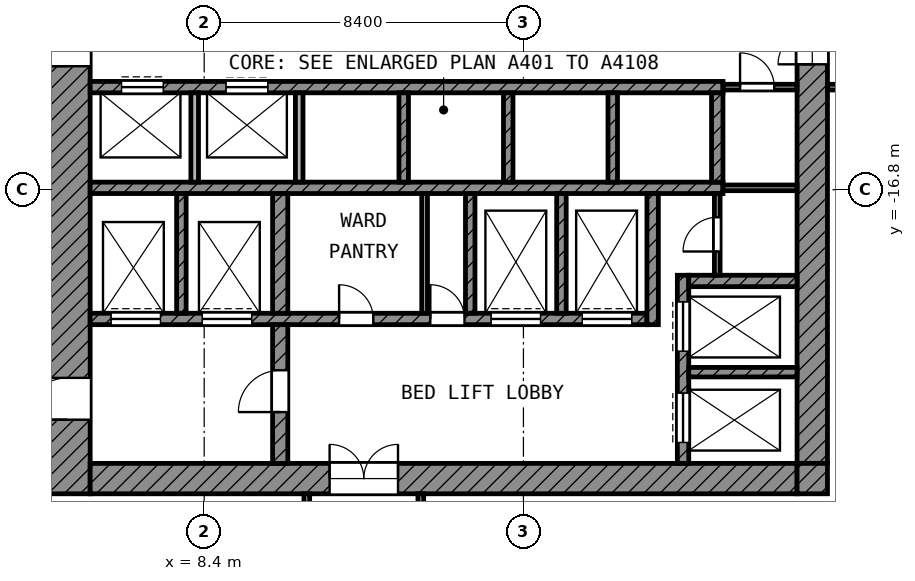
"""IFC4 building model, lengths in metres.
Left out: names, types, materials, properties, quantities, classifications, styles, units other than length and angle.
Written with IfcOpenShell. Run it as: python <this file> out.ifc"""

import sys

from ifc_helpers import new_model, si_unit, direction, frame, frame_2d, origin, place, context, subcontext, project, spatial, rectangle, extrude, element, fill, save


model = new_model("IFC4")
c1 = context("Model", 3, precision=1e-05, world=origin(), true_north=direction((0.0, 1.0)))
c2 = subcontext(c1, "Body", "Model", "MODEL_VIEW")
j1 = project(units=[si_unit("LENGTHUNIT", "METRE"), si_unit("PLANEANGLEUNIT", "RADIAN")], contexts=[c1])
p1 = place(None, origin())
s1 = spatial("IfcSite", under=j1, at=p1, CompositionType="ELEMENT")
p2 = place(p1, origin())
s2 = spatial("IfcBuilding", under=s1, at=p2, CompositionType="ELEMENT")
p3 = place(p2, frame((0.0, 0.0, 264.2)))
s3 = spatial("IfcBuildingStorey", under=s2, at=p3, CompositionType="ELEMENT", Elevation=264.2)
p4 = place(p3, frame((4.8, -24.8, 0.0), z_axis=(0.0, 0.0, 1.0), x_axis=(0.0, 1.0, 0.0)))
e1 = element("IfcWall", 1, at=p4, inside=s3, PredefinedType="SHEAR", context=c2, shape_type="SweptSolid", body=[
    extrude(rectangle(XDim=19.4, YDim=1.2, at=frame_2d((9.7, 0.0))), origin(), (0.0, 0.0, 1.0), 3.6),
])
p5 = place(p4, frame((11.25, 0.0, 0.0)))
e2 = element("IfcOpeningElement", 2, at=p5, cuts=e1, PredefinedType="OPENING", context=c2, shape_type="SweptSolid", body=[
    extrude(rectangle(XDim=1.1, YDim=2.1, at=frame_2d((0.55, 1.05))), frame((0.0, 0.61, 0.0), z_axis=(0.0, -1.0, 0.0), x_axis=(1.0, 0.0, 0.0)), (0.0, 0.0, 1.0), 1.22),
])
p6 = place(p4, frame((1.95, 0.0, 0.0)))
e3 = element("IfcOpeningElement", 3, at=p6, cuts=e1, PredefinedType="OPENING", context=c2, shape_type="SweptSolid", body=[
    extrude(rectangle(XDim=1.1, YDim=2.1, at=frame_2d((0.55, 1.05))), frame((0.0, 0.61, 0.0), z_axis=(0.0, -1.0, 0.0), x_axis=(1.0, 0.0, 0.0)), (0.0, 0.0, 1.0), 1.22),
])
p7 = place(p3, frame((24.4, -24.0, 0.0), z_axis=(0.0, 0.0, 1.0), x_axis=(0.0, 1.0, 0.0)))
e4 = element("IfcWall", 4, at=p7, inside=s3, PredefinedType="SHEAR", context=c2, shape_type="SweptSolid", body=[
    extrude(rectangle(XDim=18.6, YDim=0.8, at=frame_2d((9.3, 0.0))), origin(), (0.0, 0.0, 1.0), 3.6),
])
p8 = place(p7, frame((10.5, 0.0, 0.0)))
e5 = element("IfcOpeningElement", 5, at=p8, cuts=e4, PredefinedType="OPENING", context=c2, shape_type="SweptSolid", body=[
    extrude(rectangle(XDim=1.8, YDim=2.1, at=frame_2d((0.9, 1.05))), frame((0.0, 0.41, 0.0), z_axis=(0.0, -1.0, 0.0), x_axis=(1.0, 0.0, 0.0)), (0.0, 0.0, 1.0), 0.82),
])
p9 = place(p3, frame((5.4, -24.4, 0.0), z_axis=(0.0, 0.0, 1.0), x_axis=(1.0, 0.0, 0.0)))
e6 = element("IfcWall", 6, at=p9, inside=s3, PredefinedType="SHEAR", context=c2, shape_type="SweptSolid", body=[
    extrude(rectangle(XDim=18.6, YDim=0.8, at=frame_2d((9.3, 0.0))), origin(), (0.0, 0.0, 1.0), 3.6),
])
p10 = place(p9, frame((6.3, 0.0, 0.0)))
e7 = element("IfcOpeningElement", 7, at=p10, cuts=e6, PredefinedType="OPENING", context=c2, shape_type="SweptSolid", body=[
    extrude(rectangle(XDim=1.8, YDim=2.1, at=frame_2d((0.9, 1.05))), frame((0.0, 0.41, 0.0), z_axis=(0.0, -1.0, 0.0), x_axis=(1.0, 0.0, 0.0)), (0.0, 0.0, 1.0), 0.82),
])
p11 = place(p3, frame((24.4, -24.8, 0.0), z_axis=(0.0, 0.0, 1.0), x_axis=(0.0, 1.0, 0.0)))
e8 = element("IfcWall", 8, at=p11, inside=s3, PredefinedType="SHEAR", context=c2, shape_type="SweptSolid", body=[
    extrude(rectangle(XDim=0.8, YDim=0.8, at=frame_2d((0.4, 0.0))), origin(), (0.0, 0.0, 1.0), 3.6),
])
p12 = place(p3, frame((5.4, -14.1, 0.0), z_axis=(0.0, 0.0, 1.0), x_axis=(1.0, 0.0, 0.0)))
e9 = element("IfcWall", 9, at=p12, inside=s3, PredefinedType="SHEAR", context=c2, shape_type="SweptSolid", body=[
    extrude(rectangle(XDim=16.65, YDim=0.3, at=frame_2d((8.325, 0.0))), origin(), (0.0, 0.0, 1.0), 3.6),
])
p13 = place(p12, frame((0.825, 0.0, 0.0)))
e10 = element("IfcOpeningElement", 10, at=p13, cuts=e9, PredefinedType="OPENING", context=c2, shape_type="SweptSolid", body=[
    extrude(rectangle(XDim=1.1, YDim=2.1, at=frame_2d((0.55, 1.05))), frame((0.0, 0.16, 0.0), z_axis=(0.0, -1.0, 0.0), x_axis=(1.0, 0.0, 0.0)), (0.0, 0.0, 1.0), 0.32),
])
p14 = place(p12, frame((3.575, 0.0, 0.0)))
e11 = element("IfcOpeningElement", 11, at=p14, cuts=e9, PredefinedType="OPENING", context=c2, shape_type="SweptSolid", body=[
    extrude(rectangle(XDim=1.1, YDim=2.1, at=frame_2d((0.55, 1.05))), frame((0.0, 0.16, 0.0), z_axis=(0.0, -1.0, 0.0), x_axis=(1.0, 0.0, 0.0)), (0.0, 0.0, 1.0), 0.32),
])
p15 = place(p3, frame((5.4, -16.75, 0.0), z_axis=(0.0, 0.0, 1.0), x_axis=(1.0, 0.0, 0.0)))
e12 = element("IfcWall", 12, at=p15, inside=s3, PredefinedType="SHEAR", context=c2, shape_type="SweptSolid", body=[
    extrude(rectangle(XDim=16.65, YDim=0.3, at=frame_2d((8.325, 0.0))), origin(), (0.0, 0.0, 1.0), 3.6),
])
p16 = place(p3, frame((5.4, -20.2, 0.0), z_axis=(0.0, 0.0, 1.0), x_axis=(1.0, 0.0, 0.0)))
e13 = element("IfcWall", 13, at=p16, inside=s3, PredefinedType="SHEAR", context=c2, shape_type="SweptSolid", body=[
    extrude(rectangle(XDim=14.65, YDim=0.3, at=frame_2d((7.325, 0.0))), origin(), (0.0, 0.0, 1.0), 3.6),
])
p17 = place(p16, frame((10.55, 0.0, 0.0)))
e14 = element("IfcOpeningElement", 14, at=p17, cuts=e13, PredefinedType="OPENING", context=c2, shape_type="SweptSolid", body=[
    extrude(rectangle(XDim=1.3, YDim=2.1, at=frame_2d((0.65, 1.05))), frame((0.0, 0.16, 0.0), z_axis=(0.0, -1.0, 0.0), x_axis=(1.0, 0.0, 0.0)), (0.0, 0.0, 1.0), 0.32),
])
p18 = place(p16, frame((12.95, 0.0, 0.0)))
e15 = element("IfcOpeningElement", 15, at=p18, cuts=e13, PredefinedType="OPENING", context=c2, shape_type="SweptSolid", body=[
    extrude(rectangle(XDim=1.3, YDim=2.1, at=frame_2d((0.65, 1.05))), frame((0.0, 0.16, 0.0), z_axis=(0.0, -1.0, 0.0), x_axis=(1.0, 0.0, 0.0)), (0.0, 0.0, 1.0), 0.32),
])
p19 = place(p16, frame((0.55, 0.0, 0.0)))
e16 = element("IfcOpeningElement", 16, at=p19, cuts=e13, PredefinedType="OPENING", context=c2, shape_type="SweptSolid", body=[
    extrude(rectangle(XDim=1.3, YDim=2.1, at=frame_2d((0.65, 1.05))), frame((0.0, 0.16, 0.0), z_axis=(0.0, -1.0, 0.0), x_axis=(1.0, 0.0, 0.0)), (0.0, 0.0, 1.0), 0.32),
])
p20 = place(p16, frame((2.95, 0.0, 0.0)))
e17 = element("IfcOpeningElement", 17, at=p20, cuts=e13, PredefinedType="OPENING", context=c2, shape_type="SweptSolid", body=[
    extrude(rectangle(XDim=1.3, YDim=2.1, at=frame_2d((0.65, 1.05))), frame((0.0, 0.16, 0.0), z_axis=(0.0, -1.0, 0.0), x_axis=(1.0, 0.0, 0.0)), (0.0, 0.0, 1.0), 0.32),
])
p21 = place(p16, frame((6.55, 0.0, 0.0)))
e18 = element("IfcOpeningElement", 18, at=p21, cuts=e13, PredefinedType="OPENING", context=c2, shape_type="SweptSolid", body=[
    extrude(rectangle(XDim=0.9, YDim=2.1, at=frame_2d((0.45, 1.05))), frame((0.0, 0.16, 0.0), z_axis=(0.0, -1.0, 0.0), x_axis=(1.0, 0.0, 0.0)), (0.0, 0.0, 1.0), 0.32),
])
p22 = place(p16, frame((8.95, 0.0, 0.0)))
e19 = element("IfcOpeningElement", 19, at=p22, cuts=e13, PredefinedType="OPENING", context=c2, shape_type="SweptSolid", body=[
    extrude(rectangle(XDim=0.9, YDim=2.1, at=frame_2d((0.45, 1.05))), frame((0.0, 0.16, 0.0), z_axis=(0.0, -1.0, 0.0), x_axis=(1.0, 0.0, 0.0)), (0.0, 0.0, 1.0), 0.32),
])
p23 = place(p3, frame((10.4, -24.0, 0.0), z_axis=(0.0, 0.0, 1.0), x_axis=(0.0, 1.0, 0.0)))
e20 = element("IfcWall", 20, at=p23, inside=s3, PredefinedType="SHEAR", context=c2, shape_type="SweptSolid", body=[
    extrude(rectangle(XDim=3.65, YDim=0.4, at=frame_2d((1.825, 0.0))), origin(), (0.0, 0.0, 1.0), 3.6),
])
p24 = place(p23, frame((1.35, 0.0, 0.0)))
e21 = element("IfcOpeningElement", 21, at=p24, cuts=e20, PredefinedType="OPENING", context=c2, shape_type="SweptSolid", body=[
    extrude(rectangle(XDim=1.1, YDim=2.1, at=frame_2d((0.55, 1.05))), frame((0.0, 0.21, 0.0), z_axis=(0.0, -1.0, 0.0), x_axis=(1.0, 0.0, 0.0)), (0.0, 0.0, 1.0), 0.42),
])
p25 = place(p3, frame((10.4, -20.05, 0.0), z_axis=(0.0, 0.0, 1.0), x_axis=(0.0, 1.0, 0.0)))
e22 = element("IfcWall", 22, at=p25, inside=s3, PredefinedType="SHEAR", context=c2, shape_type="SweptSolid", body=[
    extrude(rectangle(XDim=3.15, YDim=0.4, at=frame_2d((1.575, 0.0))), origin(), (0.0, 0.0, 1.0), 3.6),
])
p26 = place(p3, frame((20.2, -20.35, 0.0), z_axis=(0.0, 0.0, 1.0), x_axis=(0.0, 1.0, 0.0)))
e23 = element("IfcWall", 23, at=p26, inside=s3, PredefinedType="SHEAR", context=c2, shape_type="SweptSolid", body=[
    extrude(rectangle(XDim=3.45, YDim=0.3, at=frame_2d((1.725, 0.0))), origin(), (0.0, 0.0, 1.0), 3.6),
])
p27 = place(p3, frame((21.9, -16.6, 0.0), z_axis=(0.0, 0.0, 1.0), x_axis=(0.0, 1.0, 0.0)))
e24 = element("IfcWall", 24, at=p27, inside=s3, PredefinedType="SHEAR", context=c2, shape_type="SweptSolid", body=[
    extrude(rectangle(XDim=2.35, YDim=0.3, at=frame_2d((1.175, 0.0))), origin(), (0.0, 0.0, 1.0), 3.6),
])
p28 = place(p3, frame((21.15, -19.2, 0.0), z_axis=(0.0, 0.0, 1.0), x_axis=(1.0, 0.0, 0.0)))
e25 = element("IfcWall", 25, at=p28, inside=s3, PredefinedType="SHEAR", context=c2, shape_type="SweptSolid", body=[
    extrude(rectangle(XDim=2.85, YDim=0.3, at=frame_2d((1.425, 0.0))), origin(), (0.0, 0.0, 1.0), 3.6),
])
p29 = place(p3, frame((21.0, -24.0, 0.0), z_axis=(0.0, 0.0, 1.0), x_axis=(0.0, 1.0, 0.0)))
e26 = element("IfcWall", 26, at=p29, inside=s3, PredefinedType="SHEAR", context=c2, shape_type="SweptSolid", body=[
    extrude(rectangle(XDim=4.95, YDim=0.3, at=frame_2d((2.475, 0.0))), origin(), (0.0, 0.0, 1.0), 3.6),
])
p30 = place(p29, frame((2.95, 0.0, 0.0)))
e27 = element("IfcOpeningElement", 27, at=p30, cuts=e26, PredefinedType="OPENING", context=c2, shape_type="SweptSolid", body=[
    extrude(rectangle(XDim=1.3, YDim=2.1, at=frame_2d((0.65, 1.05))), frame((0.0, 0.16, 0.0), z_axis=(0.0, -1.0, 0.0), x_axis=(1.0, 0.0, 0.0)), (0.0, 0.0, 1.0), 0.32),
])
p31 = place(p29, frame((0.55, 0.0, 0.0)))
e28 = element("IfcOpeningElement", 28, at=p31, cuts=e26, PredefinedType="OPENING", context=c2, shape_type="SweptSolid", body=[
    extrude(rectangle(XDim=1.3, YDim=2.1, at=frame_2d((0.65, 1.05))), frame((0.0, 0.16, 0.0), z_axis=(0.0, -1.0, 0.0), x_axis=(1.0, 0.0, 0.0)), (0.0, 0.0, 1.0), 0.32),
])
p32 = place(p3, frame((21.15, -21.6, 0.0), z_axis=(0.0, 0.0, 1.0), x_axis=(1.0, 0.0, 0.0)))
e29 = element("IfcWall", 29, at=p32, inside=s3, PredefinedType="SHEAR", context=c2, shape_type="SweptSolid", body=[
    extrude(rectangle(XDim=2.85, YDim=0.25, at=frame_2d((1.425, 0.0))), origin(), (0.0, 0.0, 1.0), 3.6),
])
for number, where, z_axis, x_axis in (
    (30, (7.8, -20.05, 0.0), (0.0, 0.0, 1.0), (0.0, 1.0, 0.0)),
    (31, (15.4, -20.05, 0.0), (0.0, 0.0, 1.0), (0.0, 1.0, 0.0)),
    (32, (17.8, -20.05, 0.0), (0.0, 0.0, 1.0), (0.0, 1.0, 0.0)),
):
    element("IfcWall", number, at=place(p3, frame(where, z_axis=z_axis, x_axis=x_axis)), inside=s3, PredefinedType="SHEAR", context=c2, shape_type="SweptSolid", body=[
        extrude(rectangle(XDim=3.15, YDim=0.25, at=frame_2d((1.575, 0.0))), origin(), (0.0, 0.0, 1.0), 3.6),
    ])
for number, where, z_axis, x_axis in (
    (33, (8.15, -16.6, 0.0), (0.0, 0.0, 1.0), (0.0, 1.0, 0.0)),
    (34, (10.9, -16.6, 0.0), (0.0, 0.0, 1.0), (0.0, 1.0, 0.0)),
):
    element("IfcWall", number, at=place(p3, frame(where, z_axis=z_axis, x_axis=x_axis)), inside=s3, PredefinedType="PARTITIONING", context=c2, shape_type="SweptSolid", body=[
        extrude(rectangle(XDim=2.35, YDim=0.2, at=frame_2d((1.175, 0.0))), origin(), (0.0, 0.0, 1.0), 3.6),
    ])
for number, where, z_axis, x_axis in (
    (35, (13.65, -16.6, 0.0), (0.0, 0.0, 1.0), (0.0, 1.0, 0.0)),
    (36, (16.4, -16.6, 0.0), (0.0, 0.0, 1.0), (0.0, 1.0, 0.0)),
    (37, (19.15, -16.6, 0.0), (0.0, 0.0, 1.0), (0.0, 1.0, 0.0)),
):
    element("IfcWall", number, at=place(p3, frame(where, z_axis=z_axis, x_axis=x_axis)), inside=s3, PredefinedType="SHEAR", context=c2, shape_type="SweptSolid", body=[
        extrude(rectangle(XDim=2.35, YDim=0.25, at=frame_2d((1.175, 0.0))), origin(), (0.0, 0.0, 1.0), 3.6),
    ])
p33 = place(p3, frame((21.9, -19.05, 0.0), z_axis=(0.0, 0.0, 1.0), x_axis=(0.0, 1.0, 0.0)))
e38 = element("IfcWall", 38, at=p33, inside=s3, PredefinedType="PARTITIONING", context=c2, shape_type="SweptSolid", body=[
    extrude(rectangle(XDim=2.15, YDim=0.15, at=frame_2d((1.075, 0.0))), origin(), (0.0, 0.0, 1.0), 3.6),
])
p34 = place(p33, frame((0.625, 0.0, 0.0)))
e39 = element("IfcOpeningElement", 39, at=p34, cuts=e38, PredefinedType="OPENING", context=c2, shape_type="SweptSolid", body=[
    extrude(rectangle(XDim=0.9, YDim=2.1, at=frame_2d((0.45, 1.05))), frame((0.0, 0.085, 0.0), z_axis=(0.0, -1.0, 0.0), x_axis=(1.0, 0.0, 0.0)), (0.0, 0.0, 1.0), 0.17),
])
p35 = place(p3, frame((22.05, -16.75, 0.0), z_axis=(0.0, 0.0, 1.0), x_axis=(1.0, 0.0, 0.0)))
e40 = element("IfcWall", 40, at=p35, inside=s3, PredefinedType="PARTITIONING", context=c2, shape_type="SweptSolid", body=[
    extrude(rectangle(XDim=1.95, YDim=0.15, at=frame_2d((0.975, 0.0))), origin(), (0.0, 0.0, 1.0), 3.6),
])
p36 = place(p3, frame((22.05, -14.1, 0.0), z_axis=(0.0, 0.0, 1.0), x_axis=(1.0, 0.0, 0.0)))
e41 = element("IfcWall", 41, at=p36, inside=s3, PredefinedType="PARTITIONING", context=c2, shape_type="SweptSolid", body=[
    extrude(rectangle(XDim=1.95, YDim=0.15, at=frame_2d((0.975, 0.0))), origin(), (0.0, 0.0, 1.0), 3.6),
])
p37 = place(p36, frame((0.45, 0.0, 0.0)))
e42 = element("IfcOpeningElement", 42, at=p37, cuts=e41, PredefinedType="OPENING", context=c2, shape_type="SweptSolid", body=[
    extrude(rectangle(XDim=0.9, YDim=2.1, at=frame_2d((0.45, 1.05))), frame((0.0, 0.085, 0.0), z_axis=(0.0, -1.0, 0.0), x_axis=(1.0, 0.0, 0.0)), (0.0, 0.0, 1.0), 0.17),
])
p38 = place(p3, frame((14.2, -20.05, 0.0), z_axis=(0.0, 0.0, 1.0), x_axis=(0.0, 1.0, 0.0)))
e43 = element("IfcWall", 43, at=p38, inside=s3, PredefinedType="PARTITIONING", context=c2, shape_type="SweptSolid", body=[
    extrude(rectangle(XDim=3.15, YDim=0.15, at=frame_2d((1.575, 0.0))), origin(), (0.0, 0.0, 1.0), 3.6),
])
p39 = place(p3, frame((24.8, -14.1, 0.0), z_axis=(0.0, 0.0, 1.0), x_axis=(1.0, 0.0, 0.0)))
e44 = element("IfcWall", 44, at=p39, inside=s3, PredefinedType="PARTITIONING", context=c2, shape_type="SweptSolid", body=[
    extrude(rectangle(XDim=4.525, YDim=0.15, at=frame_2d((2.262, 0.0))), origin(), (0.0, 0.0, 1.0), 3.6),
])
p40 = place(p39, frame((1.75, 0.0, 0.0)))
e45 = element("IfcOpeningElement", 45, at=p40, cuts=e44, PredefinedType="OPENING", context=c2, shape_type="SweptSolid", body=[
    extrude(rectangle(XDim=1.5, YDim=2.1, at=frame_2d((0.75, 1.05))), frame((0.0, 0.085, 0.0), z_axis=(0.0, -1.0, 0.0), x_axis=(1.0, 0.0, 0.0)), (0.0, 0.0, 1.0), 0.17),
])
p41 = place(p3, frame((11.1, -29.399, 0.0), z_axis=(0.0, 0.0, 1.0), x_axis=(0.0, 1.0, 0.0)))
e46 = element("IfcWall", 46, at=p41, inside=s3, PredefinedType="PARTITIONING", context=c2, shape_type="SweptSolid", body=[
    extrude(rectangle(XDim=4.599, YDim=0.15, at=frame_2d((2.299, 0.0))), origin(), (0.0, 0.0, 1.0), 3.6),
])
p42 = place(p41, frame((1.749, 0.0, 0.0)))
e47 = element("IfcOpeningElement", 47, at=p42, cuts=e46, PredefinedType="OPENING", context=c2, shape_type="SweptSolid", body=[
    extrude(rectangle(XDim=1.0, YDim=2.1, at=frame_2d((0.5, 1.05))), frame((0.0, 0.085, 0.0), z_axis=(0.0, -1.0, 0.0), x_axis=(1.0, 0.0, 0.0)), (0.0, 0.0, 1.0), 0.17),
])
p43 = place(p3, frame((14.1, -29.4, 0.0), z_axis=(0.0, 0.0, 1.0), x_axis=(0.0, 1.0, 0.0)))
e48 = element("IfcWall", 48, at=p43, inside=s3, PredefinedType="PARTITIONING", context=c2, shape_type="SweptSolid", body=[
    extrude(rectangle(XDim=4.6, YDim=0.15, at=frame_2d((2.3, 0.0))), origin(), (0.0, 0.0, 1.0), 3.6),
])
p44 = place(p13, origin())
e49 = element("IfcDoor", 49, at=p44, inside=s3, OperationType="DOUBLE_DOOR_SLIDING", PredefinedType="DOOR", context=c2, shape_type="SweptSolid", body=[
    extrude(rectangle(XDim=1.1, YDim=2.1, at=frame_2d((0.55, 1.05))), frame((0.0, 0.025, 0.0), z_axis=(0.0, -1.0, 0.0), x_axis=(1.0, 0.0, 0.0)), (0.0, 0.0, 1.0), 0.05),
])
fill(e10, e49)
p45 = place(p14, origin())
e50 = element("IfcDoor", 50, at=p45, inside=s3, OperationType="DOUBLE_DOOR_SLIDING", PredefinedType="DOOR", context=c2, shape_type="SweptSolid", body=[
    extrude(rectangle(XDim=1.1, YDim=2.1, at=frame_2d((0.55, 1.05))), frame((0.0, 0.025, 0.0), z_axis=(0.0, -1.0, 0.0), x_axis=(1.0, 0.0, 0.0)), (0.0, 0.0, 1.0), 0.05),
])
fill(e11, e50)
p46 = place(p30, origin())
e51 = element("IfcDoor", 51, at=p46, inside=s3, OperationType="DOUBLE_DOOR_SLIDING", PredefinedType="DOOR", context=c2, shape_type="SweptSolid", body=[
    extrude(rectangle(XDim=1.3, YDim=2.1, at=frame_2d((0.65, 1.05))), frame((0.0, 0.025, 0.0), z_axis=(0.0, -1.0, 0.0), x_axis=(1.0, 0.0, 0.0)), (0.0, 0.0, 1.0), 0.05),
])
fill(e27, e51)
p47 = place(p31, origin())
e52 = element("IfcDoor", 52, at=p47, inside=s3, OperationType="DOUBLE_DOOR_SLIDING", PredefinedType="DOOR", context=c2, shape_type="SweptSolid", body=[
    extrude(rectangle(XDim=1.3, YDim=2.1, at=frame_2d((0.65, 1.05))), frame((0.0, 0.025, 0.0), z_axis=(0.0, -1.0, 0.0), x_axis=(1.0, 0.0, 0.0)), (0.0, 0.0, 1.0), 0.05),
])
fill(e28, e52)
p48 = place(p17, origin())
e53 = element("IfcDoor", 53, at=p48, inside=s3, OperationType="DOUBLE_DOOR_SLIDING", PredefinedType="DOOR", context=c2, shape_type="SweptSolid", body=[
    extrude(rectangle(XDim=1.3, YDim=2.1, at=frame_2d((0.65, 1.05))), frame((0.0, 0.025, 0.0), z_axis=(0.0, -1.0, 0.0), x_axis=(1.0, 0.0, 0.0)), (0.0, 0.0, 1.0), 0.05),
])
fill(e14, e53)
p49 = place(p18, origin())
e54 = element("IfcDoor", 54, at=p49, inside=s3, OperationType="DOUBLE_DOOR_SLIDING", PredefinedType="DOOR", context=c2, shape_type="SweptSolid", body=[
    extrude(rectangle(XDim=1.3, YDim=2.1, at=frame_2d((0.65, 1.05))), frame((0.0, 0.025, 0.0), z_axis=(0.0, -1.0, 0.0), x_axis=(1.0, 0.0, 0.0)), (0.0, 0.0, 1.0), 0.05),
])
fill(e15, e54)
p50 = place(p19, origin())
e55 = element("IfcDoor", 55, at=p50, inside=s3, OperationType="DOUBLE_DOOR_SLIDING", PredefinedType="DOOR", context=c2, shape_type="SweptSolid", body=[
    extrude(rectangle(XDim=1.3, YDim=2.1, at=frame_2d((0.65, 1.05))), frame((0.0, 0.025, 0.0), z_axis=(0.0, -1.0, 0.0), x_axis=(1.0, 0.0, 0.0)), (0.0, 0.0, 1.0), 0.05),
])
fill(e16, e55)
p51 = place(p20, origin())
e56 = element("IfcDoor", 56, at=p51, inside=s3, OperationType="DOUBLE_DOOR_SLIDING", PredefinedType="DOOR", context=c2, shape_type="SweptSolid", body=[
    extrude(rectangle(XDim=1.3, YDim=2.1, at=frame_2d((0.65, 1.05))), frame((0.0, 0.025, 0.0), z_axis=(0.0, -1.0, 0.0), x_axis=(1.0, 0.0, 0.0)), (0.0, 0.0, 1.0), 0.05),
])
fill(e17, e56)
p52 = place(p5, origin())
e57 = element("IfcDoor", 57, at=p52, inside=s3, OperationType="SINGLE_SWING_LEFT", PredefinedType="DOOR", context=c2, shape_type="SweptSolid", body=[
    extrude(rectangle(XDim=1.1, YDim=2.1, at=frame_2d((0.55, 1.05))), frame((0.0, 0.025, 0.0), z_axis=(0.0, -1.0, 0.0), x_axis=(1.0, 0.0, 0.0)), (0.0, 0.0, 1.0), 0.05),
])
fill(e2, e57)
p53 = place(p6, origin())
e58 = element("IfcDoor", 58, at=p53, inside=s3, OperationType="SINGLE_SWING_LEFT", PredefinedType="DOOR", context=c2, shape_type="SweptSolid", body=[
    extrude(rectangle(XDim=1.1, YDim=2.1, at=frame_2d((0.55, 1.05))), frame((0.0, 0.025, 0.0), z_axis=(0.0, -1.0, 0.0), x_axis=(1.0, 0.0, 0.0)), (0.0, 0.0, 1.0), 0.05),
])
fill(e3, e58)
p54 = place(p24, origin())
e59 = element("IfcDoor", 59, at=p54, inside=s3, OperationType="SINGLE_SWING_LEFT", PredefinedType="DOOR", context=c2, shape_type="SweptSolid", body=[
    extrude(rectangle(XDim=1.1, YDim=2.1, at=frame_2d((0.55, 1.05))), frame((0.0, 0.025, 0.0), z_axis=(0.0, -1.0, 0.0), x_axis=(1.0, 0.0, 0.0)), (0.0, 0.0, 1.0), 0.05),
])
fill(e21, e59)
p55 = place(p8, origin())
e60 = element("IfcDoor", 60, at=p55, inside=s3, OperationType="DOUBLE_DOOR_SINGLE_SWING", PredefinedType="DOOR", context=c2, shape_type="SweptSolid", body=[
    extrude(rectangle(XDim=1.8, YDim=2.1, at=frame_2d((0.9, 1.05))), frame((0.0, 0.025, 0.0), z_axis=(0.0, -1.0, 0.0), x_axis=(1.0, 0.0, 0.0)), (0.0, 0.0, 1.0), 0.05),
])
fill(e5, e60)
p56 = place(p10, origin())
e61 = element("IfcDoor", 61, at=p56, inside=s3, OperationType="DOUBLE_DOOR_SINGLE_SWING", PredefinedType="DOOR", context=c2, shape_type="SweptSolid", body=[
    extrude(rectangle(XDim=1.8, YDim=2.1, at=frame_2d((0.9, 1.05))), frame((0.0, 0.025, 0.0), z_axis=(0.0, -1.0, 0.0), x_axis=(1.0, 0.0, 0.0)), (0.0, 0.0, 1.0), 0.05),
])
fill(e7, e61)
p57 = place(p37, origin())
e62 = element("IfcDoor", 62, at=p57, inside=s3, OperationType="SINGLE_SWING_LEFT", PredefinedType="DOOR", context=c2, shape_type="SweptSolid", body=[
    extrude(rectangle(XDim=0.9, YDim=2.1, at=frame_2d((0.45, 1.05))), frame((0.0, 0.025, 0.0), z_axis=(0.0, -1.0, 0.0), x_axis=(1.0, 0.0, 0.0)), (0.0, 0.0, 1.0), 0.05),
])
fill(e42, e62)
p58 = place(p34, origin())
e63 = element("IfcDoor", 63, at=p58, inside=s3, OperationType="SINGLE_SWING_LEFT", PredefinedType="DOOR", context=c2, shape_type="SweptSolid", body=[
    extrude(rectangle(XDim=0.9, YDim=2.1, at=frame_2d((0.45, 1.05))), frame((0.0, 0.025, 0.0), z_axis=(0.0, -1.0, 0.0), x_axis=(1.0, 0.0, 0.0)), (0.0, 0.0, 1.0), 0.05),
])
fill(e39, e63)
p59 = place(p21, origin())
e64 = element("IfcDoor", 64, at=p59, inside=s3, OperationType="SINGLE_SWING_LEFT", PredefinedType="DOOR", context=c2, shape_type="SweptSolid", body=[
    extrude(rectangle(XDim=0.9, YDim=2.1, at=frame_2d((0.45, 1.05))), frame((0.0, 0.025, 0.0), z_axis=(0.0, -1.0, 0.0), x_axis=(1.0, 0.0, 0.0)), (0.0, 0.0, 1.0), 0.05),
])
fill(e18, e64)
p60 = place(p22, origin())
e65 = element("IfcDoor", 65, at=p60, inside=s3, OperationType="SINGLE_SWING_LEFT", PredefinedType="DOOR", context=c2, shape_type="SweptSolid", body=[
    extrude(rectangle(XDim=0.9, YDim=2.1, at=frame_2d((0.45, 1.05))), frame((0.0, 0.025, 0.0), z_axis=(0.0, -1.0, 0.0), x_axis=(1.0, 0.0, 0.0)), (0.0, 0.0, 1.0), 0.05),
])
fill(e19, e65)
save(model, sys.argv[1])
